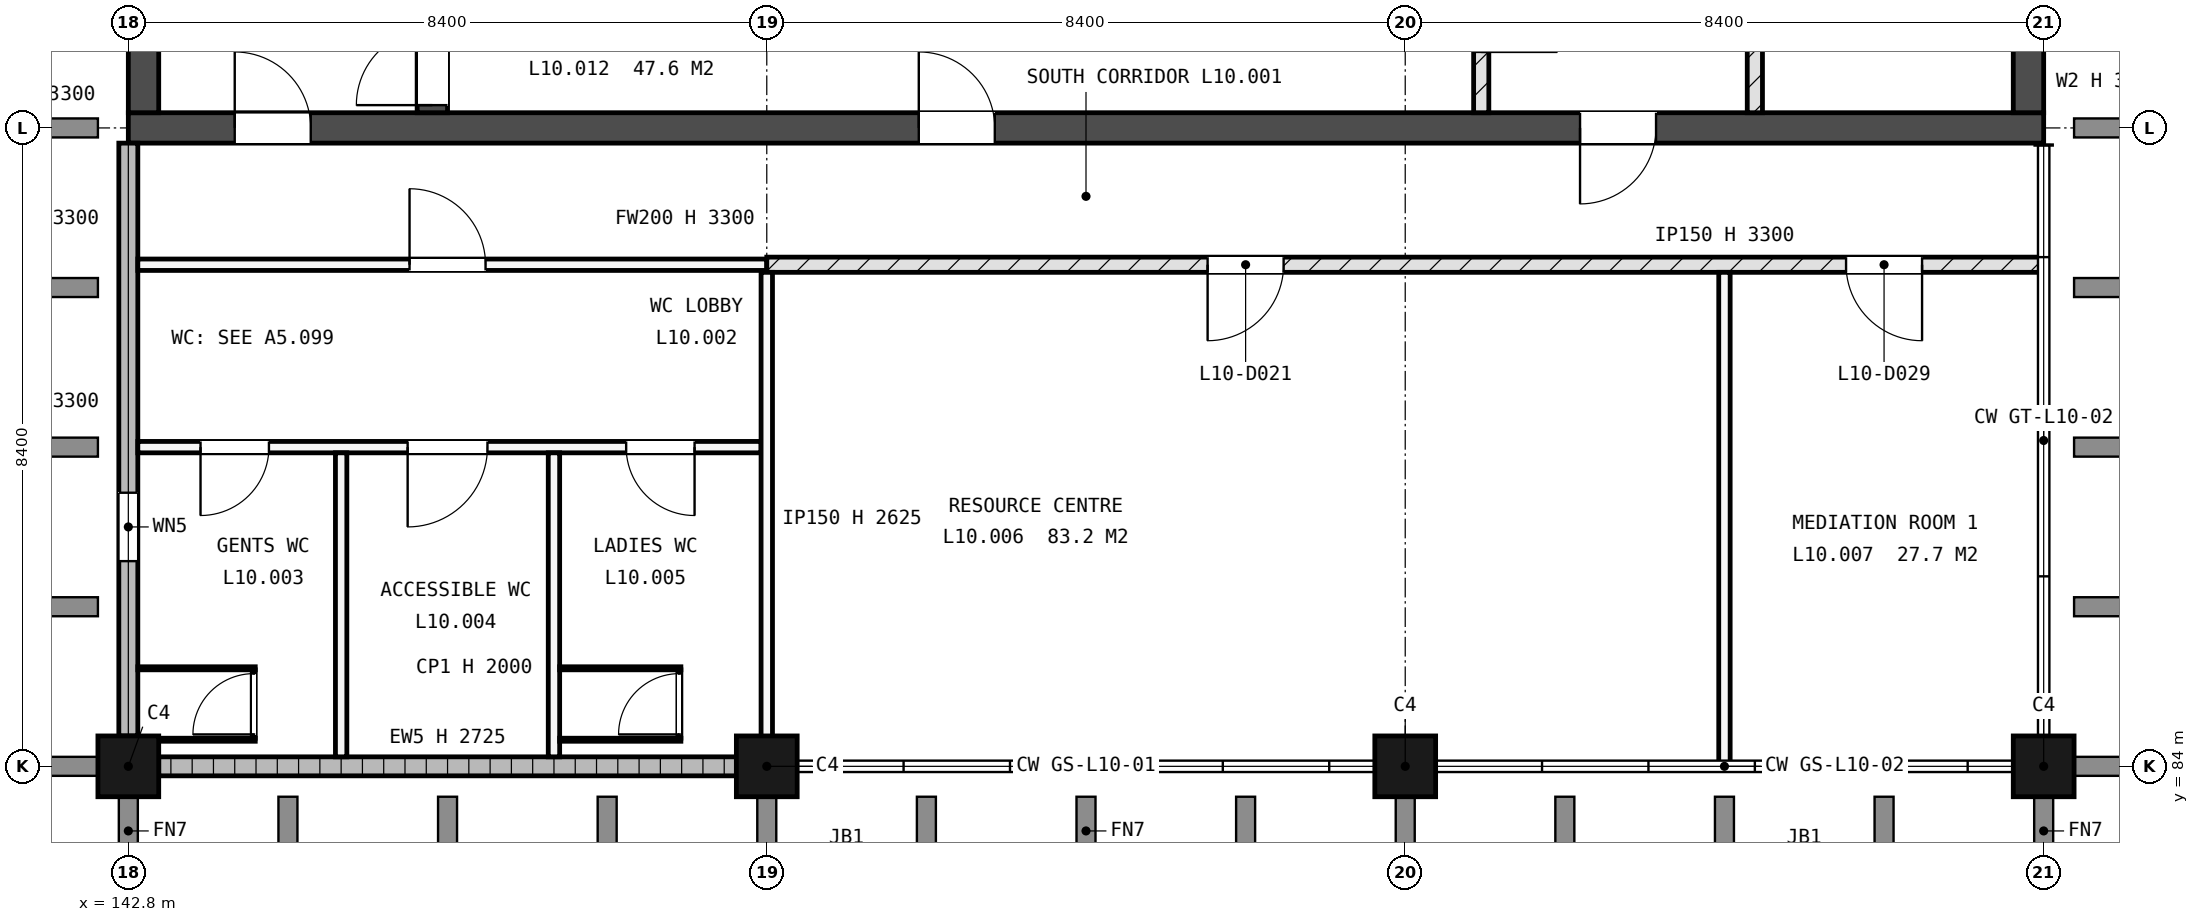
"""IFC4 building model, lengths in metres.
Left out: names, types, materials, properties, quantities, classifications, styles, units other than length and angle.
Written with IfcOpenShell. Run it as: python <this file> out.ifc"""

import sys

from ifc_helpers import new_model, si_unit, direction, frame, frame_2d, origin, origin_2d, place, context, subcontext, project, spatial, rectangle, extrude, element, fill, save


model = new_model("IFC4")
c1 = context("Model", 3, precision=1e-05, world=origin(), true_north=direction((0.0, 1.0)))
c2 = subcontext(c1, "Body", "Model", "MODEL_VIEW")
j1 = project(units=[si_unit("LENGTHUNIT", "METRE"), si_unit("PLANEANGLEUNIT", "RADIAN")], contexts=[c1])
p1 = place(None, origin())
s1 = spatial("IfcSite", under=j1, at=p1, CompositionType="ELEMENT")
p2 = place(p1, origin())
s2 = spatial("IfcBuilding", under=s1, at=p2, CompositionType="ELEMENT")
p3 = place(p2, frame((0.0, 0.0, 39.6)))
s3 = spatial("IfcBuildingStorey", under=s2, at=p3, CompositionType="ELEMENT", Elevation=39.6)
for number, where, z_axis, x_axis in (
    (1, (142.8, 84.0, -0.225), (0.0, 0.0, 1.0), (1.0, 0.0, 0.0)),
    (2, (151.2, 84.0, -0.225), (0.0, 0.0, 1.0), (1.0, 0.0, 0.0)),
    (3, (159.6, 84.0, -0.225), (0.0, 0.0, 1.0), (1.0, 0.0, 0.0)),
    (4, (168.0, 84.0, -0.225), (0.0, 0.0, 1.0), (1.0, 0.0, 0.0)),
):
    element("IfcColumn", number, at=place(p3, frame(where, z_axis=z_axis, x_axis=x_axis)), inside=s3, PredefinedType="COLUMN", context=c2, shape_type="SweptSolid", body=[
        extrude(rectangle(XDim=0.8, YDim=0.8, at=origin_2d()), origin(), (0.0, 0.0, 1.0), 3.6),
    ])
p4 = place(p3, frame((142.8, 92.4, -0.225), z_axis=(0.0, 0.0, 1.0), x_axis=(1.0, 0.0, 0.0)))
e5 = element("IfcWall", 5, at=p4, inside=s3, PredefinedType="SHEAR", context=c2, shape_type="SweptSolid", body=[
    extrude(rectangle(XDim=25.2, YDim=0.4, at=frame_2d((12.6, 0.0))), origin(), (0.0, 0.0, 1.0), 3.6),
])
p5 = place(p4, frame((1.4, 0.0, 0.225)))
e6 = element("IfcOpeningElement", 6, at=p5, cuts=e5, PredefinedType="OPENING", context=c2, shape_type="SweptSolid", body=[
    extrude(rectangle(XDim=1.0, YDim=2.1, at=frame_2d((0.5, 1.05))), frame((0.0, 0.21, 0.0), z_axis=(0.0, -1.0, 0.0), x_axis=(1.0, 0.0, 0.0)), (0.0, 0.0, 1.0), 0.42),
])
p6 = place(p4, frame((19.1, 0.0, 0.225)))
e7 = element("IfcOpeningElement", 7, at=p6, cuts=e5, PredefinedType="OPENING", context=c2, shape_type="SweptSolid", body=[
    extrude(rectangle(XDim=1.0, YDim=2.1, at=frame_2d((0.5, 1.05))), frame((0.0, 0.21, 0.0), z_axis=(0.0, -1.0, 0.0), x_axis=(1.0, 0.0, 0.0)), (0.0, 0.0, 1.0), 0.42),
])
p7 = place(p4, frame((10.4, 0.0, 0.225)))
e8 = element("IfcOpeningElement", 8, at=p7, cuts=e5, PredefinedType="OPENING", context=c2, shape_type="SweptSolid", body=[
    extrude(rectangle(XDim=1.0, YDim=2.1, at=frame_2d((0.5, 1.05))), frame((0.0, 0.21, 0.0), z_axis=(0.0, -1.0, 0.0), x_axis=(1.0, 0.0, 0.0)), (0.0, 0.0, 1.0), 0.42),
])
p8 = place(p3, frame((143.0, 92.6, -0.225), z_axis=(0.0, 0.0, 1.0), x_axis=(0.0, 1.0, 0.0)))
e9 = element("IfcWall", 9, at=p8, inside=s3, PredefinedType="SHEAR", context=c2, shape_type="SweptSolid", body=[
    extrude(rectangle(XDim=16.4, YDim=0.4, at=frame_2d((8.2, 0.0))), origin(), (0.0, 0.0, 1.0), 3.6),
])
p9 = place(p8, frame((3.0, 0.0, 1.825)))
e10 = element("IfcOpeningElement", 10, at=p9, cuts=e9, PredefinedType="OPENING", context=c2, shape_type="SweptSolid", body=[
    extrude(rectangle(XDim=1.2, YDim=0.9, at=frame_2d((0.6, 0.45))), frame((0.0, 0.21, 0.0), z_axis=(0.0, -1.0, 0.0), x_axis=(1.0, 0.0, 0.0)), (0.0, 0.0, 1.0), 0.42),
])
p10 = place(p3, frame((167.8, 92.6, -0.225), z_axis=(0.0, 0.0, 1.0), x_axis=(0.0, 1.0, 0.0)))
e11 = element("IfcWall", 11, at=p10, inside=s3, PredefinedType="SHEAR", context=c2, shape_type="SweptSolid", body=[
    extrude(rectangle(XDim=16.4, YDim=0.4, at=frame_2d((8.2, 0.0))), origin(), (0.0, 0.0, 1.0), 3.6),
])
p11 = place(p10, frame((12.2, 0.0, 1.825)))
e12 = element("IfcOpeningElement", 12, at=p11, cuts=e11, PredefinedType="OPENING", context=c2, shape_type="SweptSolid", body=[
    extrude(rectangle(XDim=1.2, YDim=0.9, at=frame_2d((0.6, 0.45))), frame((0.0, 0.21, 0.0), z_axis=(0.0, -1.0, 0.0), x_axis=(1.0, 0.0, 0.0)), (0.0, 0.0, 1.0), 0.42),
])
p12 = place(p3, frame((146.8, 92.6, -0.225), z_axis=(0.0, 0.0, 1.0), x_axis=(0.0, 1.0, 0.0)))
e13 = element("IfcWall", 13, at=p12, inside=s3, PredefinedType="SHEAR", context=c2, shape_type="SweptSolid", body=[
    extrude(rectangle(XDim=7.525, YDim=0.4, at=frame_2d((3.762, 0.0))), origin(), (0.0, 0.0, 1.0), 3.6),
])
p13 = place(p12, frame((0.1, 0.0, 0.225)))
e14 = element("IfcOpeningElement", 14, at=p13, cuts=e13, PredefinedType="OPENING", context=c2, shape_type="SweptSolid", body=[
    extrude(rectangle(XDim=1.0, YDim=2.1, at=frame_2d((0.5, 1.05))), frame((0.0, 0.21, 0.0), z_axis=(0.0, -1.0, 0.0), x_axis=(1.0, 0.0, 0.0)), (0.0, 0.0, 1.0), 0.42),
])
p14 = place(p3, frame((143.2, 84.0, 0.0), z_axis=(0.0, 0.0, 1.0), x_axis=(1.0, 0.0, 0.0)))
e15 = element("IfcWall", 15, at=p14, inside=s3, PredefinedType="STANDARD", context=c2, shape_type="SweptSolid", body=[
    extrude(rectangle(XDim=7.6, YDim=0.25, at=frame_2d((3.8, 0.0))), origin(), (0.0, 0.0, 1.0), 2.725),
])
p15 = place(p3, frame((142.8, 84.4, 0.0), z_axis=(0.0, 0.0, 1.0), x_axis=(0.0, 1.0, 0.0)))
e16 = element("IfcWall", 16, at=p15, inside=s3, PredefinedType="STANDARD", context=c2, shape_type="SweptSolid", body=[
    extrude(rectangle(XDim=7.8, YDim=0.25, at=frame_2d((3.9, 0.0))), origin(), (0.0, 0.0, 1.0), 3.3),
])
p16 = place(p15, frame((2.3, 0.0, 2.1)))
e17 = element("IfcOpeningElement", 17, at=p16, cuts=e16, PredefinedType="OPENING", context=c2, shape_type="SweptSolid", body=[
    extrude(rectangle(XDim=0.9, YDim=0.6, at=frame_2d((0.45, 0.3))), frame((0.0, 0.135, 0.0), z_axis=(0.0, -1.0, 0.0), x_axis=(1.0, 0.0, 0.0)), (0.0, 0.0, 1.0), 0.27),
])
p17 = place(p3, frame((142.925, 88.2, 0.0), z_axis=(0.0, 0.0, 1.0), x_axis=(1.0, 0.0, 0.0)))
e18 = element("IfcWall", 18, at=p17, inside=s3, PredefinedType="PARTITIONING", context=c2, shape_type="SweptSolid", body=[
    extrude(rectangle(XDim=8.2, YDim=0.15, at=frame_2d((4.1, 0.0))), origin(), (0.0, 0.0, 1.0), 3.3),
])
p18 = place(p17, frame((0.825, 0.0, 0.0)))
e19 = element("IfcOpeningElement", 19, at=p18, cuts=e18, PredefinedType="OPENING", context=c2, shape_type="SweptSolid", body=[
    extrude(rectangle(XDim=0.9, YDim=2.1, at=frame_2d((0.45, 1.05))), frame((0.0, 0.085, 0.0), z_axis=(0.0, -1.0, 0.0), x_axis=(1.0, 0.0, 0.0)), (0.0, 0.0, 1.0), 0.17),
])
p19 = place(p17, frame((3.55, 0.0, 0.0)))
e20 = element("IfcOpeningElement", 20, at=p19, cuts=e18, PredefinedType="OPENING", context=c2, shape_type="SweptSolid", body=[
    extrude(rectangle(XDim=1.05, YDim=2.25, at=frame_2d((0.525, 1.125))), frame((0.0, 0.085, 0.0), z_axis=(0.0, -1.0, 0.0), x_axis=(1.0, 0.0, 0.0)), (0.0, 0.0, 1.0), 0.17),
])
p20 = place(p17, frame((6.425, 0.0, 0.0)))
e21 = element("IfcOpeningElement", 21, at=p20, cuts=e18, PredefinedType="OPENING", context=c2, shape_type="SweptSolid", body=[
    extrude(rectangle(XDim=0.9, YDim=2.1, at=frame_2d((0.45, 1.05))), frame((0.0, 0.085, 0.0), z_axis=(0.0, -1.0, 0.0), x_axis=(1.0, 0.0, 0.0)), (0.0, 0.0, 1.0), 0.17),
])
p21 = place(p3, frame((142.925, 90.6, 0.0), z_axis=(0.0, 0.0, 1.0), x_axis=(1.0, 0.0, 0.0)))
e22 = element("IfcWall", 22, at=p21, inside=s3, PredefinedType="PARTITIONING", context=c2, shape_type="SweptSolid", body=[
    extrude(rectangle(XDim=8.275, YDim=0.15, at=frame_2d((4.137, 0.0))), origin(), (0.0, 0.0, 1.0), 3.3),
])
p22 = place(p21, frame((3.575, 0.0, 0.0)))
e23 = element("IfcOpeningElement", 23, at=p22, cuts=e22, PredefinedType="OPENING", context=c2, shape_type="SweptSolid", body=[
    extrude(rectangle(XDim=1.0, YDim=2.1, at=frame_2d((0.5, 1.05))), frame((0.0, 0.085, 0.0), z_axis=(0.0, -1.0, 0.0), x_axis=(1.0, 0.0, 0.0)), (0.0, 0.0, 1.0), 0.17),
])
p23 = place(p3, frame((151.2, 90.6, 0.0), z_axis=(0.0, 0.0, 1.0), x_axis=(1.0, 0.0, 0.0)))
e24 = element("IfcWall", 24, at=p23, inside=s3, PredefinedType="SOLIDWALL", context=c2, shape_type="SweptSolid", body=[
    extrude(rectangle(XDim=16.8, YDim=0.2, at=frame_2d((8.4, 0.0))), origin(), (0.0, 0.0, 1.0), 3.3),
])
p24 = place(p23, frame((5.8, 0.0, 0.0)))
e25 = element("IfcOpeningElement", 25, at=p24, cuts=e24, PredefinedType="OPENING", context=c2, shape_type="SweptSolid", body=[
    extrude(rectangle(XDim=1.0, YDim=2.1, at=frame_2d((0.5, 1.05))), frame((0.0, 0.11, 0.0), z_axis=(0.0, -1.0, 0.0), x_axis=(1.0, 0.0, 0.0)), (0.0, 0.0, 1.0), 0.22),
])
p25 = place(p23, frame((14.2, 0.0, 0.0)))
e26 = element("IfcOpeningElement", 26, at=p25, cuts=e24, PredefinedType="OPENING", context=c2, shape_type="SweptSolid", body=[
    extrude(rectangle(XDim=1.0, YDim=2.1, at=frame_2d((0.5, 1.05))), frame((0.0, 0.11, 0.0), z_axis=(0.0, -1.0, 0.0), x_axis=(1.0, 0.0, 0.0)), (0.0, 0.0, 1.0), 0.22),
])
for number, where, z_axis, x_axis in (
    (27, (145.6, 84.125, 0.0), (0.0, 0.0, 1.0), (0.0, 1.0, 0.0)),
    (28, (148.4, 84.125, 0.0), (0.0, 0.0, 1.0), (0.0, 1.0, 0.0)),
):
    element("IfcWall", number, at=place(p3, frame(where, z_axis=z_axis, x_axis=x_axis)), inside=s3, PredefinedType="PARTITIONING", context=c2, shape_type="SweptSolid", body=[
        extrude(rectangle(XDim=4.0, YDim=0.15, at=frame_2d((2.0, 0.0))), origin(), (0.0, 0.0, 1.0), 3.3),
    ])
p26 = place(p3, frame((151.2, 84.0, 0.0), z_axis=(0.0, 0.0, 1.0), x_axis=(0.0, 1.0, 0.0)))
e29 = element("IfcWall", 29, at=p26, inside=s3, PredefinedType="PARTITIONING", context=c2, shape_type="SweptSolid", body=[
    extrude(rectangle(XDim=6.5, YDim=0.15, at=frame_2d((3.25, 0.0))), origin(), (0.0, 0.0, 1.0), 2.625),
])
p27 = place(p3, frame((160.6, 92.6, 0.0), z_axis=(0.0, 0.0, 1.0), x_axis=(0.0, 1.0, 0.0)))
e30 = element("IfcWall", 30, at=p27, inside=s3, PredefinedType="SOLIDWALL", context=c2, shape_type="SweptSolid", body=[
    extrude(rectangle(XDim=12.5, YDim=0.2, at=frame_2d((6.25, 0.0))), origin(), (0.0, 0.0, 1.0), 3.3),
])
p28 = place(p27, frame((5.1, 0.0, 0.0)))
e31 = element("IfcOpeningElement", 31, at=p28, cuts=e30, PredefinedType="OPENING", context=c2, shape_type="SweptSolid", body=[
    extrude(rectangle(XDim=0.8, YDim=2.1, at=frame_2d((0.4, 1.05))), frame((0.0, 0.11, 0.0), z_axis=(0.0, -1.0, 0.0), x_axis=(1.0, 0.0, 0.0)), (0.0, 0.0, 1.0), 0.22),
])
p29 = place(p27, frame((0.8, 0.0, 0.0)))
e32 = element("IfcOpeningElement", 32, at=p29, cuts=e30, PredefinedType="OPENING", context=c2, shape_type="SweptSolid", body=[
    extrude(rectangle(XDim=1.0, YDim=2.1, at=frame_2d((0.5, 1.05))), frame((0.0, 0.11, 0.0), z_axis=(0.0, -1.0, 0.0), x_axis=(1.0, 0.0, 0.0)), (0.0, 0.0, 1.0), 0.22),
])
p30 = place(p3, frame((163.8, 84.0, 0.0), z_axis=(0.0, 0.0, 1.0), x_axis=(0.0, 1.0, 0.0)))
e33 = element("IfcWall", 33, at=p30, inside=s3, PredefinedType="PARTITIONING", context=c2, shape_type="SweptSolid", body=[
    extrude(rectangle(XDim=6.5, YDim=0.15, at=frame_2d((3.25, 0.0))), origin(), (0.0, 0.0, 1.0), 3.3),
])
p31 = place(p3, frame((164.2, 92.6, 0.0), z_axis=(0.0, 0.0, 1.0), x_axis=(0.0, 1.0, 0.0)))
e34 = element("IfcWall", 34, at=p31, inside=s3, PredefinedType="SOLIDWALL", context=c2, shape_type="SweptSolid", body=[
    extrude(rectangle(XDim=8.75, YDim=0.2, at=frame_2d((4.375, 0.0))), origin(), (0.0, 0.0, 1.0), 3.3),
])
p32 = place(p31, frame((1.7, 0.0, 0.0)))
e35 = element("IfcOpeningElement", 35, at=p32, cuts=e34, PredefinedType="OPENING", context=c2, shape_type="SweptSolid", body=[
    extrude(rectangle(XDim=0.8, YDim=2.1, at=frame_2d((0.4, 1.05))), frame((0.0, 0.11, 0.0), z_axis=(0.0, -1.0, 0.0), x_axis=(1.0, 0.0, 0.0)), (0.0, 0.0, 1.0), 0.22),
])
p33 = place(p31, frame((6.3, 0.0, 0.0)))
e36 = element("IfcOpeningElement", 36, at=p33, cuts=e34, PredefinedType="OPENING", context=c2, shape_type="SweptSolid", body=[
    extrude(rectangle(XDim=0.8, YDim=2.1, at=frame_2d((0.4, 1.05))), frame((0.0, 0.11, 0.0), z_axis=(0.0, -1.0, 0.0), x_axis=(1.0, 0.0, 0.0)), (0.0, 0.0, 1.0), 0.22),
])
p34 = place(p3, frame((142.93, 84.35, 0.0), z_axis=(0.0, 0.0, 1.0), x_axis=(1.0, 0.0, 0.0)))
e37 = element("IfcWall", 37, at=p34, inside=s3, PredefinedType="PARTITIONING", context=c2, shape_type="SweptSolid", body=[
    extrude(rectangle(XDim=1.54, YDim=0.04, at=frame_2d((0.77, 0.0))), origin(), (0.0, 0.0, 1.0), 2.0),
])
p35 = place(p3, frame((142.925, 85.29, 0.0), z_axis=(0.0, 0.0, 1.0), x_axis=(1.0, 0.0, 0.0)))
e38 = element("IfcWall", 38, at=p35, inside=s3, PredefinedType="PARTITIONING", context=c2, shape_type="SweptSolid", body=[
    extrude(rectangle(XDim=1.545, YDim=0.04, at=frame_2d((0.772, 0.0))), origin(), (0.0, 0.0, 1.0), 2.0),
])
p36 = place(p3, frame((144.45, 84.37, 0.0), z_axis=(0.0, 0.0, 1.0), x_axis=(0.0, 1.0, 0.0)))
e39 = element("IfcWall", 39, at=p36, inside=s3, PredefinedType="PARTITIONING", context=c2, shape_type="SweptSolid", body=[
    extrude(rectangle(XDim=0.9, YDim=0.04, at=frame_2d((0.45, 0.0))), origin(), (0.0, 0.0, 1.0), 2.0),
])
p37 = place(p36, frame((0.05, 0.0, 0.0)))
e40 = element("IfcOpeningElement", 40, at=p37, cuts=e39, PredefinedType="OPENING", context=c2, shape_type="SweptSolid", body=[
    extrude(rectangle(XDim=0.8, YDim=2.0, at=frame_2d((0.4, 1.0))), frame((0.0, 0.03, 0.0), z_axis=(0.0, -1.0, 0.0), x_axis=(1.0, 0.0, 0.0)), (0.0, 0.0, 1.0), 0.06),
])
for number, where, z_axis, x_axis in (
    (41, (148.475, 84.35, 0.0), (0.0, 0.0, 1.0), (1.0, 0.0, 0.0)),
    (42, (148.475, 85.29, 0.0), (0.0, 0.0, 1.0), (1.0, 0.0, 0.0)),
):
    element("IfcWall", number, at=place(p3, frame(where, z_axis=z_axis, x_axis=x_axis)), inside=s3, PredefinedType="PARTITIONING", context=c2, shape_type="SweptSolid", body=[
        extrude(rectangle(XDim=1.595, YDim=0.04, at=frame_2d((0.797, 0.0))), origin(), (0.0, 0.0, 1.0), 2.0),
    ])
p38 = place(p3, frame((150.05, 84.37, 0.0), z_axis=(0.0, 0.0, 1.0), x_axis=(0.0, 1.0, 0.0)))
e43 = element("IfcWall", 43, at=p38, inside=s3, PredefinedType="PARTITIONING", context=c2, shape_type="SweptSolid", body=[
    extrude(rectangle(XDim=0.9, YDim=0.04, at=frame_2d((0.45, 0.0))), origin(), (0.0, 0.0, 1.0), 2.0),
])
p39 = place(p38, frame((0.05, 0.0, 0.0)))
e44 = element("IfcOpeningElement", 44, at=p39, cuts=e43, PredefinedType="OPENING", context=c2, shape_type="SweptSolid", body=[
    extrude(rectangle(XDim=0.8, YDim=2.0, at=frame_2d((0.4, 1.0))), frame((0.0, 0.03, 0.0), z_axis=(0.0, -1.0, 0.0), x_axis=(1.0, 0.0, 0.0)), (0.0, 0.0, 1.0), 0.06),
])
p40 = place(p16, origin())
e45 = element("IfcWindow", 45, at=p40, inside=s3, PartitioningType="SINGLE_PANEL", PredefinedType="WINDOW", context=c2, shape_type="SweptSolid", body=[
    extrude(rectangle(XDim=0.9, YDim=0.6, at=frame_2d((0.45, 0.3))), frame((0.0, 0.03, 0.0), z_axis=(0.0, -1.0, 0.0), x_axis=(1.0, 0.0, 0.0)), (0.0, 0.0, 1.0), 0.06),
])
fill(e17, e45)
p41 = place(p5, origin())
e46 = element("IfcDoor", 46, at=p41, inside=s3, OperationType="SINGLE_SWING_RIGHT", PredefinedType="DOOR", context=c2, shape_type="SweptSolid", body=[
    extrude(rectangle(XDim=1.0, YDim=2.1, at=frame_2d((0.5, 1.05))), frame((0.0, 0.025, 0.0), z_axis=(0.0, -1.0, 0.0), x_axis=(1.0, 0.0, 0.0)), (0.0, 0.0, 1.0), 0.05),
])
fill(e6, e46)
p42 = place(p13, origin())
e47 = element("IfcDoor", 47, at=p42, inside=s3, OperationType="SINGLE_SWING_RIGHT", PredefinedType="DOOR", context=c2, shape_type="SweptSolid", body=[
    extrude(rectangle(XDim=1.0, YDim=2.1, at=frame_2d((0.5, 1.05))), frame((0.0, 0.025, 0.0), z_axis=(0.0, -1.0, 0.0), x_axis=(1.0, 0.0, 0.0)), (0.0, 0.0, 1.0), 0.05),
])
fill(e14, e47)
p43 = place(p18, origin())
e48 = element("IfcDoor", 48, at=p43, inside=s3, OperationType="SINGLE_SWING_LEFT", PredefinedType="DOOR", context=c2, shape_type="SweptSolid", body=[
    extrude(rectangle(XDim=0.9, YDim=2.1, at=frame_2d((0.45, 1.05))), frame((0.0, 0.025, 0.0), z_axis=(0.0, -1.0, 0.0), x_axis=(1.0, 0.0, 0.0)), (0.0, 0.0, 1.0), 0.05),
])
fill(e19, e48)
p44 = place(p19, origin())
e49 = element("IfcDoor", 49, at=p44, inside=s3, OperationType="SINGLE_SWING_LEFT", PredefinedType="DOOR", context=c2, shape_type="SweptSolid", body=[
    extrude(rectangle(XDim=1.05, YDim=2.25, at=frame_2d((0.525, 1.125))), frame((0.0, 0.025, 0.0), z_axis=(0.0, -1.0, 0.0), x_axis=(1.0, 0.0, 0.0)), (0.0, 0.0, 1.0), 0.05),
])
fill(e20, e49)
p45 = place(p20, origin())
e50 = element("IfcDoor", 50, at=p45, inside=s3, OperationType="SINGLE_SWING_RIGHT", PredefinedType="DOOR", context=c2, shape_type="SweptSolid", body=[
    extrude(rectangle(XDim=0.9, YDim=2.1, at=frame_2d((0.45, 1.05))), frame((0.0, 0.025, 0.0), z_axis=(0.0, -1.0, 0.0), x_axis=(1.0, 0.0, 0.0)), (0.0, 0.0, 1.0), 0.05),
])
fill(e21, e50)
p46 = place(p24, origin())
e51 = element("IfcDoor", 51, at=p46, inside=s3, OperationType="SINGLE_SWING_LEFT", PredefinedType="DOOR", context=c2, shape_type="SweptSolid", body=[
    extrude(rectangle(XDim=1.0, YDim=2.1, at=frame_2d((0.5, 1.05))), frame((0.0, 0.025, 0.0), z_axis=(0.0, -1.0, 0.0), x_axis=(1.0, 0.0, 0.0)), (0.0, 0.0, 1.0), 0.05),
])
fill(e25, e51)
p47 = place(p25, origin())
e52 = element("IfcDoor", 52, at=p47, inside=s3, OperationType="SINGLE_SWING_RIGHT", PredefinedType="DOOR", context=c2, shape_type="SweptSolid", body=[
    extrude(rectangle(XDim=1.0, YDim=2.1, at=frame_2d((0.5, 1.05))), frame((0.0, 0.025, 0.0), z_axis=(0.0, -1.0, 0.0), x_axis=(1.0, 0.0, 0.0)), (0.0, 0.0, 1.0), 0.05),
])
fill(e26, e52)
p48 = place(p22, origin())
e53 = element("IfcDoor", 53, at=p48, inside=s3, OperationType="SINGLE_SWING_RIGHT", PredefinedType="DOOR", context=c2, shape_type="SweptSolid", body=[
    extrude(rectangle(XDim=1.0, YDim=2.1, at=frame_2d((0.5, 1.05))), frame((0.0, 0.025, 0.0), z_axis=(0.0, -1.0, 0.0), x_axis=(1.0, 0.0, 0.0)), (0.0, 0.0, 1.0), 0.05),
])
fill(e23, e53)
p49 = place(p6, origin())
e54 = element("IfcDoor", 54, at=p49, inside=s3, OperationType="SINGLE_SWING_LEFT", PredefinedType="DOOR", context=c2, shape_type="SweptSolid", body=[
    extrude(rectangle(XDim=1.0, YDim=2.1, at=frame_2d((0.5, 1.05))), frame((0.0, 0.025, 0.0), z_axis=(0.0, -1.0, 0.0), x_axis=(1.0, 0.0, 0.0)), (0.0, 0.0, 1.0), 0.05),
])
fill(e7, e54)
p50 = place(p7, origin())
e55 = element("IfcDoor", 55, at=p50, inside=s3, OperationType="SINGLE_SWING_RIGHT", PredefinedType="DOOR", context=c2, shape_type="SweptSolid", body=[
    extrude(rectangle(XDim=1.0, YDim=2.1, at=frame_2d((0.5, 1.05))), frame((0.0, 0.025, 0.0), z_axis=(0.0, -1.0, 0.0), x_axis=(1.0, 0.0, 0.0)), (0.0, 0.0, 1.0), 0.05),
])
fill(e8, e55)
p51 = place(p37, origin())
e56 = element("IfcDoor", 56, at=p51, inside=s3, OperationType="SINGLE_SWING_LEFT", PredefinedType="DOOR", context=c2, shape_type="SweptSolid", body=[
    extrude(rectangle(XDim=0.8, YDim=2.0, at=frame_2d((0.4, 1.0))), frame((0.0, 0.02, 0.0), z_axis=(0.0, -1.0, 0.0), x_axis=(1.0, 0.0, 0.0)), (0.0, 0.0, 1.0), 0.04),
])
fill(e40, e56)
p52 = place(p39, origin())
e57 = element("IfcDoor", 57, at=p52, inside=s3, OperationType="SINGLE_SWING_LEFT", PredefinedType="DOOR", context=c2, shape_type="SweptSolid", body=[
    extrude(rectangle(XDim=0.8, YDim=2.0, at=frame_2d((0.4, 1.0))), frame((0.0, 0.02, 0.0), z_axis=(0.0, -1.0, 0.0), x_axis=(1.0, 0.0, 0.0)), (0.0, 0.0, 1.0), 0.04),
])
fill(e44, e57)
save(model, sys.argv[1])
